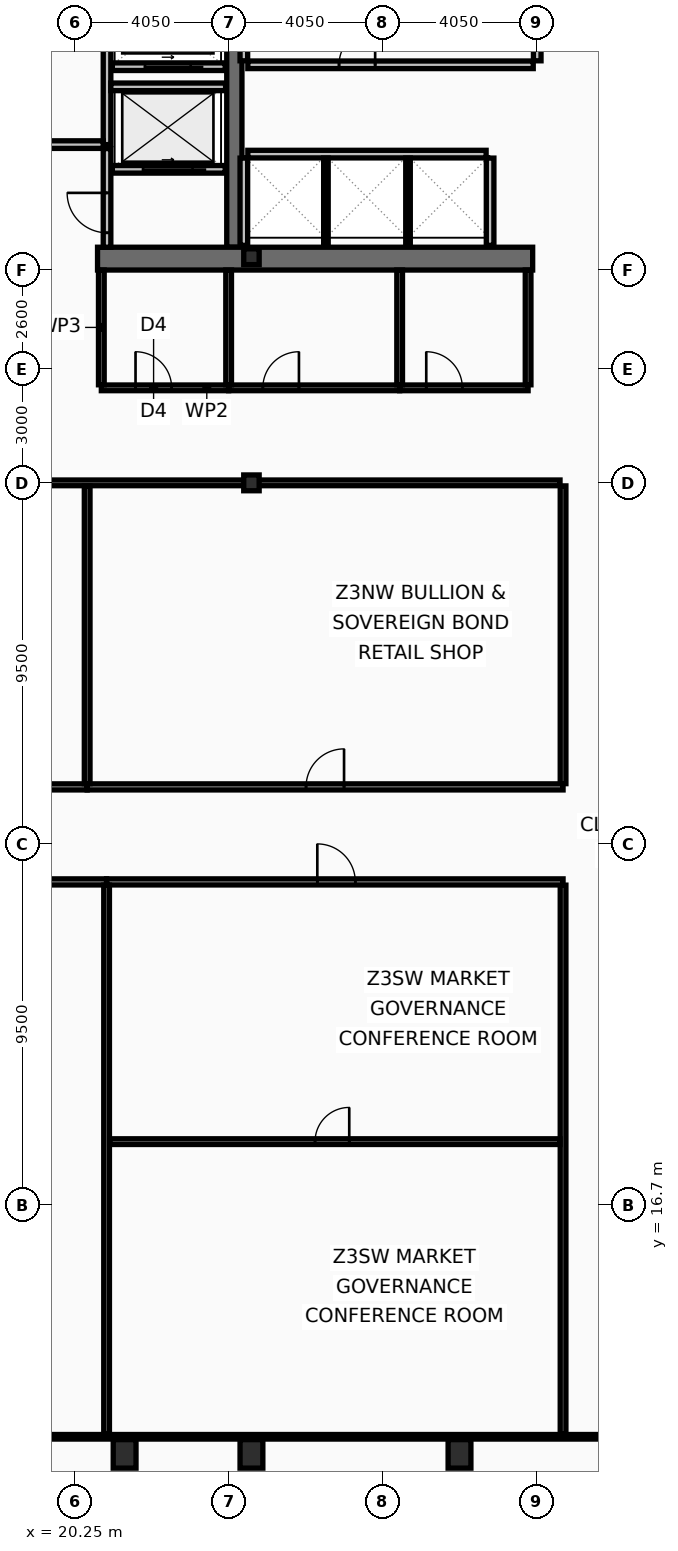
"""IFC4 building model, lengths in metres.
Left out: names, types, materials, properties, quantities, classifications, styles, units other than length and angle.
Written with IfcOpenShell. Run it as: python <this file> out.ifc"""

import sys

from ifc_helpers import new_model, si_unit, direction, frame, frame_2d, origin, origin_2d, place, context, subcontext, project, spatial, rectangle, hollow_rectangle, i_section, extrude, element, fill, save


model = new_model("IFC4")
c1 = context("Model", 3, precision=1e-05, world=origin(), true_north=direction((0.0, 1.0)))
c2 = subcontext(c1, "Body", "Model", "MODEL_VIEW")
j1 = project(units=[si_unit("LENGTHUNIT", "METRE"), si_unit("PLANEANGLEUNIT", "RADIAN")], contexts=[c1])
p1 = place(None, origin())
s1 = spatial("IfcSite", under=j1, at=p1, CompositionType="ELEMENT")
p2 = place(p1, origin())
s2 = spatial("IfcBuilding", under=s1, at=p2, CompositionType="ELEMENT")
p3 = place(p2, frame((0.0, 0.0, 188.6)))
s3 = spatial("IfcBuildingStorey", under=s2, at=p3, CompositionType="ELEMENT", Elevation=188.6)
p4 = place(p3, frame((24.45, 41.9, 0.0), z_axis=(0.0, 0.0, 1.0), x_axis=(0.0, 1.0, 0.0)))
e1 = element("IfcWall", 1, at=p4, inside=s3, PredefinedType="SHEAR", context=c2, shape_type="SweptSolid", body=[
    extrude(rectangle(XDim=11.2, YDim=0.4, at=frame_2d((5.6, 0.0))), origin(), (0.0, 0.0, 1.0), 3.44),
])
p5 = place(p3, frame((32.3, 41.6, 0.0), z_axis=(0.0, 0.0, 1.0), x_axis=(-1.0, 0.0, 0.0)))
e2 = element("IfcWall", 2, at=p5, inside=s3, PredefinedType="SHEAR", context=c2, shape_type="SweptSolid", body=[
    extrude(rectangle(XDim=11.45, YDim=0.6, at=frame_2d((5.725, 0.0))), origin(), (0.0, 0.0, 1.0), 3.44),
])
for number, where, z_axis, x_axis in (
    (3, (21.562, 10.15, 0.0), (0.0, 0.0, 1.0), (1.0, 0.0, 0.0)),
    (4, (24.9, 10.15, 0.0), (0.0, 0.0, 1.0), (1.0, 0.0, 0.0)),
    (5, (30.375, 10.15, 0.0), (0.0, 0.0, 1.0), (1.0, 0.0, 0.0)),
):
    element("IfcColumn", number, at=place(p3, frame(where, z_axis=z_axis, x_axis=x_axis)), inside=s3, PredefinedType="COLUMN", context=c2, shape_type="SweptSolid", body=[
        extrude(hollow_rectangle(XDim=0.6, YDim=0.75, WallThickness=0.045, at=origin_2d()), origin(), (0.0, 0.0, 1.0), 3.6),
    ])
for number, where, z_axis, x_axis in (
    (6, (24.9, 35.7, 0.0), (0.0, 0.0, 1.0), (1.0, 0.0, 0.0)),
    (7, (24.9, 41.65, 0.0), (0.0, 0.0, 1.0), (1.0, 0.0, 0.0)),
):
    element("IfcColumn", number, at=place(p3, frame(where, z_axis=z_axis, x_axis=x_axis)), inside=s3, PredefinedType="COLUMN", context=c2, shape_type="SweptSolid", body=[
        extrude(i_section(OverallWidth=0.406, OverallDepth=0.416, WebThickness=0.03, FlangeThickness=0.048, at=origin_2d()), origin(), (0.0, 0.0, 1.0), 3.6),
    ])
p6 = place(p3, frame((24.21, 43.95, 0.0), z_axis=(0.0, 0.0, 1.0), x_axis=(-1.0, 0.0, 0.0)))
e8 = element("IfcWall", 8, at=p6, inside=s3, PredefinedType="PARTITIONING", context=c2, shape_type="SweptSolid", body=[
    extrude(rectangle(XDim=2.97, YDim=0.2, at=frame_2d((1.485, 0.0))), origin(), (0.0, 0.0, 1.0), 3.44),
])
p7 = place(p6, frame((0.86, 0.0, 0.0)))
e9 = element("IfcOpeningElement", 9, at=p7, cuts=e8, PredefinedType="OPENING", context=c2, shape_type="SweptSolid", body=[
    extrude(rectangle(XDim=1.3, YDim=2.18, at=frame_2d((0.65, 1.09))), frame((0.0, 0.11, 0.0), z_axis=(0.0, -1.0, 0.0), x_axis=(1.0, 0.0, 0.0)), (0.0, 0.0, 1.0), 0.22),
])
p8 = place(p3, frame((24.21, 46.65, 0.0), z_axis=(0.0, 0.0, 1.0), x_axis=(-1.0, 0.0, 0.0)))
e10 = element("IfcWall", 10, at=p8, inside=s3, PredefinedType="PARTITIONING", context=c2, shape_type="SweptSolid", body=[
    extrude(rectangle(XDim=2.97, YDim=0.2, at=frame_2d((1.485, 0.0))), origin(), (0.0, 0.0, 1.0), 3.44),
])
p9 = place(p8, frame((0.91, 0.0, 0.0)))
e11 = element("IfcOpeningElement", 11, at=p9, cuts=e10, PredefinedType="OPENING", context=c2, shape_type="SweptSolid", body=[
    extrude(rectangle(XDim=1.2, YDim=2.18, at=frame_2d((0.6, 1.09))), frame((0.0, 0.11, 0.0), z_axis=(0.0, -1.0, 0.0), x_axis=(1.0, 0.0, 0.0)), (0.0, 0.0, 1.0), 0.22),
])
p10 = place(p3, frame((21.1, 44.6, 0.0), z_axis=(0.0, 0.0, 1.0), x_axis=(0.0, 1.0, 0.0)))
e12 = element("IfcWall", 12, at=p10, inside=s3, PredefinedType="PARTITIONING", context=c2, shape_type="SweptSolid", body=[
    extrude(rectangle(XDim=4.3, YDim=0.2, at=frame_2d((2.15, 0.0))), origin(), (0.0, 0.0, 1.0), 3.44),
])
p11 = place(p3, frame((16.8, 44.6, 0.0), z_axis=(0.0, 0.0, 1.0), x_axis=(1.0, 0.0, 0.0)))
e13 = element("IfcWall", 13, at=p11, inside=s3, PredefinedType="PARTITIONING", context=c2, shape_type="SweptSolid", body=[
    extrude(rectangle(XDim=4.2, YDim=0.2, at=frame_2d((2.1, 0.0))), origin(), (0.0, 0.0, 1.0), 3.44),
])
p12 = place(p11, frame((1.25, 0.0, 0.0)))
e14 = element("IfcOpeningElement", 14, at=p12, cuts=e13, PredefinedType="OPENING", context=c2, shape_type="SweptSolid", body=[
    extrude(rectangle(XDim=1.05, YDim=2.15, at=frame_2d((0.525, 1.075))), frame((0.0, 0.11, 0.0), z_axis=(0.0, -1.0, 0.0), x_axis=(1.0, 0.0, 0.0)), (0.0, 0.0, 1.0), 0.22),
])
p13 = place(p3, frame((21.2, 46.12, 0.0), z_axis=(0.0, 0.0, 1.0), x_axis=(1.0, 0.0, 0.0)))
e15 = element("IfcWall", 15, at=p13, inside=s3, PredefinedType="PARTITIONING", context=c2, shape_type="SweptSolid", body=[
    extrude(rectangle(XDim=3.02, YDim=0.2, at=frame_2d((1.51, 0.0))), origin(), (0.0, 0.0, 1.0), 3.44),
])
p14 = place(p3, frame((21.1, 41.9, 0.0), z_axis=(0.0, 0.0, 1.0), x_axis=(0.0, 1.0, 0.0)))
e16 = element("IfcWall", 16, at=p14, inside=s3, PredefinedType="PARTITIONING", context=c2, shape_type="SweptSolid", body=[
    extrude(rectangle(XDim=2.595, YDim=0.2, at=frame_2d((1.298, 0.0))), origin(), (0.0, 0.0, 1.0), 3.44),
])
p15 = place(p14, frame((0.38, 0.0, 0.0)))
e17 = element("IfcOpeningElement", 17, at=p15, cuts=e16, PredefinedType="OPENING", context=c2, shape_type="SweptSolid", body=[
    extrude(rectangle(XDim=1.05, YDim=2.15, at=frame_2d((0.525, 1.075))), frame((0.0, 0.11, 0.0), z_axis=(0.0, -1.0, 0.0), x_axis=(1.0, 0.0, 0.0)), (0.0, 0.0, 1.0), 0.22),
])
for number, where, z_axis, x_axis in (
    (18, (24.7, 46.805, 0.0), (0.0, 0.0, 1.0), (0.0, 1.0, 0.0)),
    (19, (32.42, 46.805, 0.0), (0.0, 0.0, 1.0), (0.0, 1.0, 0.0)),
):
    element("IfcWall", number, at=place(p3, frame(where, z_axis=z_axis, x_axis=x_axis)), inside=s3, PredefinedType="PARTITIONING", context=c2, shape_type="SweptSolid", body=[
        extrude(rectangle(XDim=5.99, YDim=0.2, at=frame_2d((2.995, 0.0))), origin(), (0.0, 0.0, 1.0), 3.44),
    ])
p16 = place(p3, frame((24.805, 46.7, 0.0), z_axis=(0.0, 0.0, 1.0), x_axis=(1.0, 0.0, 0.0)))
e20 = element("IfcWall", 20, at=p16, inside=s3, PredefinedType="PARTITIONING", context=c2, shape_type="SweptSolid", body=[
    extrude(rectangle(XDim=7.51, YDim=0.2, at=frame_2d((3.755, 0.0))), origin(), (0.0, 0.0, 1.0), 3.44),
])
p17 = place(p16, frame((2.4, 0.0, 0.0)))
e21 = element("IfcOpeningElement", 21, at=p17, cuts=e20, PredefinedType="OPENING", context=c2, shape_type="SweptSolid", body=[
    extrude(rectangle(XDim=0.95, YDim=2.1, at=frame_2d((0.475, 1.05))), frame((0.0, 0.11, 0.0), z_axis=(0.0, -1.0, 0.0), x_axis=(1.0, 0.0, 0.0)), (0.0, 0.0, 1.0), 0.22),
])
p18 = place(p3, frame((24.805, 44.35, 0.0), z_axis=(0.0, 0.0, 1.0), x_axis=(1.0, 0.0, 0.0)))
e22 = element("IfcWall", 22, at=p18, inside=s3, PredefinedType="PARTITIONING", context=c2, shape_type="SweptSolid", body=[
    extrude(rectangle(XDim=6.27, YDim=0.2, at=frame_2d((3.135, 0.0))), origin(), (0.0, 0.0, 1.0), 3.44),
])
for number, where, z_axis, x_axis in (
    (23, (24.7, 41.95, 0.0), (0.0, 0.0, 1.0), (0.0, 1.0, 0.0)),
    (24, (31.18, 41.95, 0.0), (0.0, 0.0, 1.0), (0.0, 1.0, 0.0)),
):
    element("IfcWall", number, at=place(p3, frame(where, z_axis=z_axis, x_axis=x_axis)), inside=s3, PredefinedType="PARTITIONING", context=c2, shape_type="SweptSolid", body=[
        extrude(rectangle(XDim=2.295, YDim=0.2, at=frame_2d((1.147, 0.0))), origin(), (0.0, 0.0, 1.0), 3.44),
    ])
for number, where, z_axis, x_axis in (
    (25, (26.86, 41.95, 0.0), (0.0, 0.0, 1.0), (0.0, 1.0, 0.0)),
    (26, (29.02, 41.95, 0.0), (0.0, 0.0, 1.0), (0.0, 1.0, 0.0)),
):
    element("IfcWall", number, at=place(p3, frame(where, z_axis=z_axis, x_axis=x_axis)), inside=s3, PredefinedType="PARTITIONING", context=c2, shape_type="SweptSolid", body=[
        extrude(rectangle(XDim=2.295, YDim=0.12, at=frame_2d((1.147, 0.0))), origin(), (0.0, 0.0, 1.0), 3.44),
    ])
p19 = place(p3, frame((20.95, 38.2, 0.0), z_axis=(0.0, 0.0, 1.0), x_axis=(1.0, 0.0, 0.0)))
e27 = element("IfcWall", 27, at=p19, inside=s3, PredefinedType="PARTITIONING", context=c2, shape_type="SweptSolid", body=[
    extrude(rectangle(XDim=3.35, YDim=0.15, at=frame_2d((1.675, 0.0))), origin(), (0.0, 0.0, 1.0), 3.44),
])
p20 = place(p19, frame((0.9, 0.0, 0.0)))
e28 = element("IfcOpeningElement", 28, at=p20, cuts=e27, PredefinedType="OPENING", context=c2, shape_type="SweptSolid", body=[
    extrude(rectangle(XDim=0.95, YDim=2.05, at=frame_2d((0.475, 1.025))), frame((0.0, 0.085, 0.0), z_axis=(0.0, -1.0, 0.0), x_axis=(1.0, 0.0, 0.0)), (0.0, 0.0, 1.0), 0.17),
])
p21 = place(p3, frame((24.3, 38.2, 0.0), z_axis=(0.0, 0.0, 1.0), x_axis=(1.0, 0.0, 0.0)))
e29 = element("IfcWall", 29, at=p21, inside=s3, PredefinedType="PARTITIONING", context=c2, shape_type="SweptSolid", body=[
    extrude(rectangle(XDim=4.5, YDim=0.15, at=frame_2d((2.25, 0.0))), origin(), (0.0, 0.0, 1.0), 2.73),
])
p22 = place(p21, frame((0.9, 0.0, 0.0)))
e30 = element("IfcOpeningElement", 30, at=p22, cuts=e29, PredefinedType="OPENING", context=c2, shape_type="SweptSolid", body=[
    extrude(rectangle(XDim=0.95, YDim=2.05, at=frame_2d((0.475, 1.025))), frame((0.0, 0.085, 0.0), z_axis=(0.0, -1.0, 0.0), x_axis=(1.0, 0.0, 0.0)), (0.0, 0.0, 1.0), 0.17),
])
p23 = place(p3, frame((28.8, 38.2, 0.0), z_axis=(0.0, 0.0, 1.0), x_axis=(1.0, 0.0, 0.0)))
e31 = element("IfcWall", 31, at=p23, inside=s3, PredefinedType="PARTITIONING", context=c2, shape_type="SweptSolid", body=[
    extrude(rectangle(XDim=3.38, YDim=0.15, at=frame_2d((1.69, 0.0))), origin(), (0.0, 0.0, 1.0), 2.73),
])
p24 = place(p23, frame((0.7, 0.0, 0.0)))
e32 = element("IfcOpeningElement", 32, at=p24, cuts=e31, PredefinedType="OPENING", context=c2, shape_type="SweptSolid", body=[
    extrude(rectangle(XDim=0.95, YDim=2.05, at=frame_2d((0.475, 1.025))), frame((0.0, 0.085, 0.0), z_axis=(0.0, -1.0, 0.0), x_axis=(1.0, 0.0, 0.0)), (0.0, 0.0, 1.0), 0.17),
])
for number, where, z_axis, x_axis in (
    (33, (20.95, 38.28, 0.0), (0.0, 0.0, 1.0), (0.0, 1.0, 0.0)),
    (34, (24.3, 38.28, 0.0), (0.0, 0.0, 1.0), (0.0, 1.0, 0.0)),
    (35, (28.8, 38.28, 0.0), (0.0, 0.0, 1.0), (0.0, 1.0, 0.0)),
    (36, (32.18, 38.28, 0.0), (0.0, 0.0, 1.0), (0.0, 1.0, 0.0)),
):
    element("IfcWall", number, at=place(p3, frame(where, z_axis=z_axis, x_axis=x_axis)), inside=s3, PredefinedType="PARTITIONING", context=c2, shape_type="SweptSolid", body=[
        extrude(rectangle(XDim=3.02, YDim=0.15, at=frame_2d((1.51, 0.0))), origin(), (0.0, 0.0, 1.0), 3.44),
    ])
p25 = place(p3, frame((33.1, 10.665, 0.0), z_axis=(0.0, 0.0, 1.0), x_axis=(0.0, 1.0, 0.0)))
e37 = element("IfcWall", 37, at=p25, inside=s3, PredefinedType="PARTITIONING", context=c2, shape_type="SweptSolid", body=[
    extrude(rectangle(XDim=14.45, YDim=0.15, at=frame_2d((7.225, 0.0))), origin(), (0.0, 0.0, 1.0), 2.93),
])
p26 = place(p3, frame((33.1, 27.785, 0.0), z_axis=(0.0, 0.0, 1.0), x_axis=(0.0, 1.0, 0.0)))
e38 = element("IfcWall", 38, at=p26, inside=s3, PredefinedType="PARTITIONING", context=c2, shape_type="SweptSolid", body=[
    extrude(rectangle(XDim=7.835, YDim=0.15, at=frame_2d((3.917, 0.0))), origin(), (0.0, 0.0, 1.0), 2.93),
])
p27 = place(p3, frame((8.095, 35.7, 0.0), z_axis=(0.0, 0.0, 1.0), x_axis=(1.0, 0.0, 0.0)))
e39 = element("IfcWall", 39, at=p27, inside=s3, PredefinedType="PARTITIONING", context=c2, shape_type="SweptSolid", body=[
    extrude(rectangle(XDim=24.925, YDim=0.15, at=frame_2d((12.462, 0.0))), origin(), (0.0, 0.0, 1.0), 2.73),
])
p28 = place(p3, frame((12.972, 25.2, 0.0), z_axis=(0.0, 0.0, 1.0), x_axis=(1.0, 0.0, 0.0)))
e40 = element("IfcWall", 40, at=p28, inside=s3, PredefinedType="PARTITIONING", context=c2, shape_type="SweptSolid", body=[
    extrude(rectangle(XDim=8.116, YDim=0.16, at=frame_2d((4.058, 0.0))), origin(), (0.0, 0.0, 1.0), 2.73),
])
p29 = place(p28, frame((3.909, 0.0, 0.0)))
e41 = element("IfcOpeningElement", 41, at=p29, cuts=e40, PredefinedType="OPENING", context=c2, shape_type="SweptSolid", body=[
    extrude(rectangle(XDim=1.0, YDim=2.05, at=frame_2d((0.5, 1.025))), frame((0.0, 0.09, 0.0), z_axis=(0.0, -1.0, 0.0), x_axis=(1.0, 0.0, 0.0)), (0.0, 0.0, 1.0), 0.18),
])
p30 = place(p3, frame((21.088, 25.2, 0.0), z_axis=(0.0, 0.0, 1.0), x_axis=(1.0, 0.0, 0.0)))
e42 = element("IfcWall", 42, at=p30, inside=s3, PredefinedType="PARTITIONING", context=c2, shape_type="SweptSolid", body=[
    extrude(rectangle(XDim=12.012, YDim=0.16, at=frame_2d((6.006, 0.0))), origin(), (0.0, 0.0, 1.0), 2.73),
])
p31 = place(p30, frame((5.545, 0.0, 0.0)))
e43 = element("IfcOpeningElement", 43, at=p31, cuts=e42, PredefinedType="OPENING", context=c2, shape_type="SweptSolid", body=[
    extrude(rectangle(XDim=1.0, YDim=2.05, at=frame_2d((0.5, 1.025))), frame((0.0, 0.09, 0.0), z_axis=(0.0, -1.0, 0.0), x_axis=(1.0, 0.0, 0.0)), (0.0, 0.0, 1.0), 0.18),
])
p32 = place(p3, frame((21.088, 10.665, 0.0), z_axis=(0.0, 0.0, 1.0), x_axis=(0.0, 1.0, 0.0)))
e44 = element("IfcWall", 44, at=p32, inside=s3, PredefinedType="PARTITIONING", context=c2, shape_type="SweptSolid", body=[
    extrude(rectangle(XDim=14.45, YDim=0.15, at=frame_2d((7.225, 0.0))), origin(), (0.0, 0.0, 1.0), 2.93),
])
p33 = place(p3, frame((21.168, 18.366, 0.0), z_axis=(0.0, 0.0, 1.0), x_axis=(1.0, 0.0, 0.0)))
e45 = element("IfcWall", 45, at=p33, inside=s3, PredefinedType="PARTITIONING", context=c2, shape_type="SweptSolid", body=[
    extrude(rectangle(XDim=11.852, YDim=0.15, at=frame_2d((5.926, 0.0))), origin(), (0.0, 0.0, 1.0), 2.73),
])
p34 = place(p33, frame((5.405, 0.0, 0.0)))
e46 = element("IfcOpeningElement", 46, at=p34, cuts=e45, PredefinedType="OPENING", context=c2, shape_type="SweptSolid", body=[
    extrude(rectangle(XDim=0.9, YDim=2.05, at=frame_2d((0.45, 1.025))), frame((0.0, 0.085, 0.0), z_axis=(0.0, -1.0, 0.0), x_axis=(1.0, 0.0, 0.0)), (0.0, 0.0, 1.0), 0.17),
])
p35 = place(p3, frame((8.03, 27.7, 0.0), z_axis=(0.0, 0.0, 1.0), x_axis=(1.0, 0.0, 0.0)))
e47 = element("IfcWall", 47, at=p35, inside=s3, PredefinedType="PARTITIONING", context=c2, shape_type="SweptSolid", body=[
    extrude(rectangle(XDim=12.547, YDim=0.16, at=frame_2d((6.273, 0.0))), origin(), (0.0, 0.0, 1.0), 2.73),
])
p36 = place(p35, frame((5.77, 0.0, 0.0)))
e48 = element("IfcOpeningElement", 48, at=p36, cuts=e47, PredefinedType="OPENING", context=c2, shape_type="SweptSolid", body=[
    extrude(rectangle(XDim=1.0, YDim=2.05, at=frame_2d((0.5, 1.025))), frame((0.0, 0.09, 0.0), z_axis=(0.0, -1.0, 0.0), x_axis=(1.0, 0.0, 0.0)), (0.0, 0.0, 1.0), 0.18),
])
p37 = place(p3, frame((20.577, 27.7, 0.0), z_axis=(0.0, 0.0, 1.0), x_axis=(1.0, 0.0, 0.0)))
e49 = element("IfcWall", 49, at=p37, inside=s3, PredefinedType="PARTITIONING", context=c2, shape_type="SweptSolid", body=[
    extrude(rectangle(XDim=12.523, YDim=0.16, at=frame_2d((6.261, 0.0))), origin(), (0.0, 0.0, 1.0), 2.73),
])
p38 = place(p37, frame((5.76, 0.0, 0.0)))
e50 = element("IfcOpeningElement", 50, at=p38, cuts=e49, PredefinedType="OPENING", context=c2, shape_type="SweptSolid", body=[
    extrude(rectangle(XDim=1.0, YDim=2.05, at=frame_2d((0.5, 1.025))), frame((0.0, 0.09, 0.0), z_axis=(0.0, -1.0, 0.0), x_axis=(1.0, 0.0, 0.0)), (0.0, 0.0, 1.0), 0.18),
])
p39 = place(p3, frame((20.577, 27.785, 0.0), z_axis=(0.0, 0.0, 1.0), x_axis=(0.0, 1.0, 0.0)))
e51 = element("IfcWall", 51, at=p39, inside=s3, PredefinedType="PARTITIONING", context=c2, shape_type="SweptSolid", body=[
    extrude(rectangle(XDim=7.835, YDim=0.15, at=frame_2d((3.917, 0.0))), origin(), (0.0, 0.0, 1.0), 2.93),
])
p40 = place(p3, frame((8.095, 10.6, 0.0), z_axis=(0.0, 0.0, 1.0), x_axis=(1.0, 0.0, 0.0)))
e52 = element("IfcWall", 52, at=p40, inside=s3, PredefinedType="PARTITIONING", context=c2, shape_type="SweptSolid", body=[
    extrude(rectangle(XDim=56.71, YDim=0.12, at=frame_2d((28.355, 0.0))), origin(), (0.0, 0.0, 1.0), 2.73),
])
p41 = place(p7, origin())
e53 = element("IfcDoor", 53, at=p41, inside=s3, OperationType="SLIDING_TO_LEFT", PredefinedType="DOOR", context=c2, shape_type="SweptSolid", body=[
    extrude(rectangle(XDim=1.3, YDim=2.18, at=frame_2d((0.65, 1.09))), frame((0.0, 0.025, 0.0), z_axis=(0.0, -1.0, 0.0), x_axis=(1.0, 0.0, 0.0)), (0.0, 0.0, 1.0), 0.05),
])
fill(e9, e53)
p42 = place(p9, origin())
e54 = element("IfcDoor", 54, at=p42, inside=s3, OperationType="SLIDING_TO_LEFT", PredefinedType="DOOR", context=c2, shape_type="SweptSolid", body=[
    extrude(rectangle(XDim=1.2, YDim=2.18, at=frame_2d((0.6, 1.09))), frame((0.0, 0.025, 0.0), z_axis=(0.0, -1.0, 0.0), x_axis=(1.0, 0.0, 0.0)), (0.0, 0.0, 1.0), 0.05),
])
fill(e11, e54)
p43 = place(p15, origin())
e55 = element("IfcDoor", 55, at=p43, inside=s3, OperationType="SINGLE_SWING_RIGHT", PredefinedType="DOOR", context=c2, shape_type="SweptSolid", body=[
    extrude(rectangle(XDim=1.05, YDim=2.15, at=frame_2d((0.525, 1.075))), frame((0.0, 0.025, 0.0), z_axis=(0.0, -1.0, 0.0), x_axis=(1.0, 0.0, 0.0)), (0.0, 0.0, 1.0), 0.05),
])
fill(e17, e55)
p44 = place(p17, origin())
e56 = element("IfcDoor", 56, at=p44, inside=s3, OperationType="SINGLE_SWING_RIGHT", PredefinedType="DOOR", context=c2, shape_type="SweptSolid", body=[
    extrude(rectangle(XDim=0.95, YDim=2.1, at=frame_2d((0.475, 1.05))), frame((0.0, 0.025, 0.0), z_axis=(0.0, -1.0, 0.0), x_axis=(1.0, 0.0, 0.0)), (0.0, 0.0, 1.0), 0.05),
])
fill(e21, e56)
p45 = place(p20, origin())
e57 = element("IfcDoor", 57, at=p45, inside=s3, OperationType="SINGLE_SWING_LEFT", PredefinedType="DOOR", context=c2, shape_type="SweptSolid", body=[
    extrude(rectangle(XDim=0.95, YDim=2.05, at=frame_2d((0.475, 1.025))), frame((0.0, 0.025, 0.0), z_axis=(0.0, -1.0, 0.0), x_axis=(1.0, 0.0, 0.0)), (0.0, 0.0, 1.0), 0.05),
])
fill(e28, e57)
p46 = place(p22, origin())
e58 = element("IfcDoor", 58, at=p46, inside=s3, OperationType="SINGLE_SWING_RIGHT", PredefinedType="DOOR", context=c2, shape_type="SweptSolid", body=[
    extrude(rectangle(XDim=0.95, YDim=2.05, at=frame_2d((0.475, 1.025))), frame((0.0, 0.025, 0.0), z_axis=(0.0, -1.0, 0.0), x_axis=(1.0, 0.0, 0.0)), (0.0, 0.0, 1.0), 0.05),
])
fill(e30, e58)
p47 = place(p24, origin())
e59 = element("IfcDoor", 59, at=p47, inside=s3, OperationType="SINGLE_SWING_LEFT", PredefinedType="DOOR", context=c2, shape_type="SweptSolid", body=[
    extrude(rectangle(XDim=0.95, YDim=2.05, at=frame_2d((0.475, 1.025))), frame((0.0, 0.025, 0.0), z_axis=(0.0, -1.0, 0.0), x_axis=(1.0, 0.0, 0.0)), (0.0, 0.0, 1.0), 0.05),
])
fill(e32, e59)
p48 = place(p31, origin())
e60 = element("IfcDoor", 60, at=p48, inside=s3, OperationType="SINGLE_SWING_LEFT", PredefinedType="DOOR", context=c2, shape_type="SweptSolid", body=[
    extrude(rectangle(XDim=1.0, YDim=2.05, at=frame_2d((0.5, 1.025))), frame((0.0, 0.025, 0.0), z_axis=(0.0, -1.0, 0.0), x_axis=(1.0, 0.0, 0.0)), (0.0, 0.0, 1.0), 0.05),
])
fill(e43, e60)
p49 = place(p34, origin())
e61 = element("IfcDoor", 61, at=p49, inside=s3, OperationType="SINGLE_SWING_RIGHT", PredefinedType="DOOR", context=c2, shape_type="SweptSolid", body=[
    extrude(rectangle(XDim=0.9, YDim=2.05, at=frame_2d((0.45, 1.025))), frame((0.0, 0.025, 0.0), z_axis=(0.0, -1.0, 0.0), x_axis=(1.0, 0.0, 0.0)), (0.0, 0.0, 1.0), 0.05),
])
fill(e46, e61)
p50 = place(p38, origin())
e62 = element("IfcDoor", 62, at=p50, inside=s3, OperationType="SINGLE_SWING_RIGHT", PredefinedType="DOOR", context=c2, shape_type="SweptSolid", body=[
    extrude(rectangle(XDim=1.0, YDim=2.05, at=frame_2d((0.5, 1.025))), frame((0.0, 0.025, 0.0), z_axis=(0.0, -1.0, 0.0), x_axis=(1.0, 0.0, 0.0)), (0.0, 0.0, 1.0), 0.05),
])
fill(e50, e62)
save(model, sys.argv[1])
